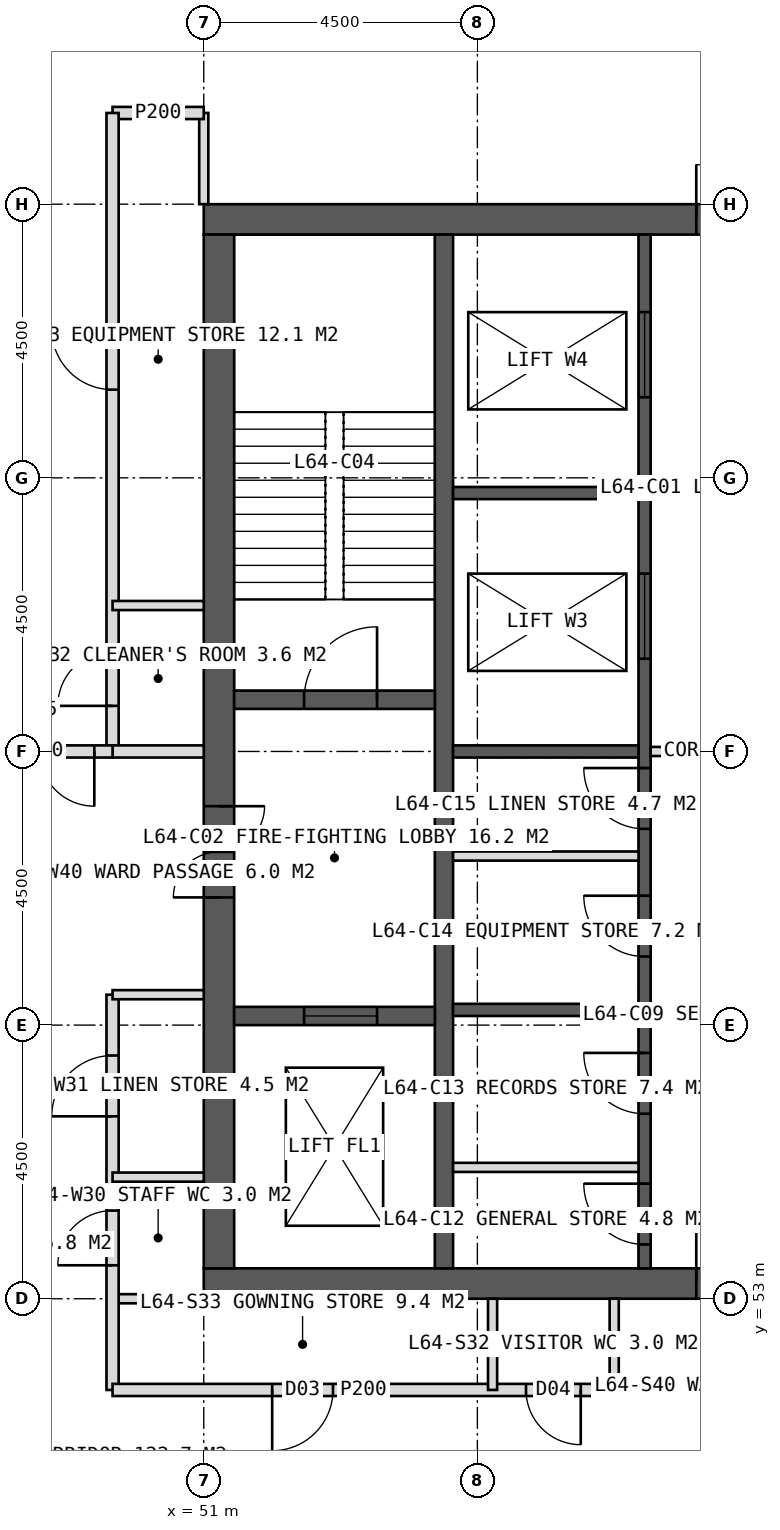
"""IFC4 building model, lengths in metres.
Left out: names, types, materials, properties, quantities, classifications, styles, units other than length and angle.
Written with IfcOpenShell. Run it as: python <this file> out.ifc"""

import sys

from ifc_helpers import new_model, si_unit, direction, frame, frame_2d, origin, place, context, subcontext, project, spatial, rectangle, extrude, element, fill, save


model = new_model("IFC4")
c1 = context("Model", 3, precision=1e-05, world=origin(), true_north=direction((0.0, 1.0)))
c2 = subcontext(c1, "Body", "Model", "MODEL_VIEW")
j1 = project(units=[si_unit("LENGTHUNIT", "METRE"), si_unit("PLANEANGLEUNIT", "RADIAN")], contexts=[c1])
p1 = place(None, origin())
s1 = spatial("IfcSite", under=j1, at=p1, CompositionType="ELEMENT")
p2 = place(p1, origin())
s2 = spatial("IfcBuilding", under=s1, at=p2, CompositionType="ELEMENT")
p3 = place(p2, frame((0.0, 0.0, 266.0)))
s3 = spatial("IfcBuildingStorey", under=s2, at=p3, CompositionType="ELEMENT", Elevation=266.0)
p4 = place(p3, frame((51.0, 70.75, 0.0), z_axis=(0.0, 0.0, 1.0), x_axis=(1.0, 0.0, 0.0)))
e1 = element("IfcWall", 1, at=p4, inside=s3, PredefinedType="SHEAR", context=c2, shape_type="SweptSolid", body=[
    extrude(rectangle(XDim=18.0, YDim=0.5, at=frame_2d((9.0, 0.0))), origin(), (0.0, 0.0, 1.0), 4.0),
])
p5 = place(p4, frame((8.1, 0.0, 0.0)))
e2 = element("IfcOpeningElement", 2, at=p5, cuts=e1, PredefinedType="OPENING", context=c2, shape_type="SweptSolid", body=[
    extrude(rectangle(XDim=1.8, YDim=2.2, at=frame_2d((0.9, 1.1))), frame((0.0, 0.26, 0.0), z_axis=(0.0, -1.0, 0.0), x_axis=(1.0, 0.0, 0.0)), (0.0, 0.0, 1.0), 0.52),
])
p6 = place(p3, frame((51.0, 53.25, 0.0), z_axis=(0.0, 0.0, 1.0), x_axis=(1.0, 0.0, 0.0)))
e3 = element("IfcWall", 3, at=p6, inside=s3, PredefinedType="SHEAR", context=c2, shape_type="SweptSolid", body=[
    extrude(rectangle(XDim=18.0, YDim=0.5, at=frame_2d((9.0, 0.0))), origin(), (0.0, 0.0, 1.0), 4.0),
])
p7 = place(p6, frame((8.1, 0.0, 0.0)))
e4 = element("IfcOpeningElement", 4, at=p7, cuts=e3, PredefinedType="OPENING", context=c2, shape_type="SweptSolid", body=[
    extrude(rectangle(XDim=1.8, YDim=2.2, at=frame_2d((0.9, 1.1))), frame((0.0, 0.26, 0.0), z_axis=(0.0, -1.0, 0.0), x_axis=(1.0, 0.0, 0.0)), (0.0, 0.0, 1.0), 0.52),
])
p8 = place(p3, frame((51.25, 53.5, 0.0), z_axis=(0.0, 0.0, 1.0), x_axis=(0.0, 1.0, 0.0)))
e5 = element("IfcWall", 5, at=p8, inside=s3, PredefinedType="SHEAR", context=c2, shape_type="SweptSolid", body=[
    extrude(rectangle(XDim=17.0, YDim=0.5, at=frame_2d((8.5, 0.0))), origin(), (0.0, 0.0, 1.0), 4.0),
])
p9 = place(p8, frame((6.1, 0.0, 0.0)))
e6 = element("IfcOpeningElement", 6, at=p9, cuts=e5, PredefinedType="OPENING", context=c2, shape_type="SweptSolid", body=[
    extrude(rectangle(XDim=1.5, YDim=2.2, at=frame_2d((0.75, 1.1))), frame((0.0, 0.26, 0.0), z_axis=(0.0, -1.0, 0.0), x_axis=(1.0, 0.0, 0.0)), (0.0, 0.0, 1.0), 0.52),
])
p10 = place(p3, frame((54.95, 53.5, 0.0), z_axis=(0.0, 0.0, 1.0), x_axis=(0.0, 1.0, 0.0)))
e7 = element("IfcWall", 7, at=p10, inside=s3, PredefinedType="SHEAR", context=c2, shape_type="SweptSolid", body=[
    extrude(rectangle(XDim=17.0, YDim=0.3, at=frame_2d((8.5, 0.0))), origin(), (0.0, 0.0, 1.0), 4.0),
])
p11 = place(p3, frame((58.25, 53.5, 0.0), z_axis=(0.0, 0.0, 1.0), x_axis=(0.0, 1.0, 0.0)))
e8 = element("IfcWall", 8, at=p11, inside=s3, PredefinedType="SHEAR", context=c2, shape_type="SweptSolid", body=[
    extrude(rectangle(XDim=17.0, YDim=0.2, at=frame_2d((8.5, 0.0))), origin(), (0.0, 0.0, 1.0), 4.0),
])
p12 = place(p11, frame((0.393, 0.0, 0.0)))
e9 = element("IfcOpeningElement", 9, at=p12, cuts=e8, PredefinedType="OPENING", context=c2, shape_type="SweptSolid", body=[
    extrude(rectangle(XDim=1.0, YDim=2.1, at=frame_2d((0.5, 1.05))), frame((0.0, 0.11, 0.0), z_axis=(0.0, -1.0, 0.0), x_axis=(1.0, 0.0, 0.0)), (0.0, 0.0, 1.0), 0.22),
])
p13 = place(p11, frame((2.542, 0.0, 0.0)))
e10 = element("IfcOpeningElement", 10, at=p13, cuts=e8, PredefinedType="OPENING", context=c2, shape_type="SweptSolid", body=[
    extrude(rectangle(XDim=1.0, YDim=2.1, at=frame_2d((0.5, 1.05))), frame((0.0, 0.11, 0.0), z_axis=(0.0, -1.0, 0.0), x_axis=(1.0, 0.0, 0.0)), (0.0, 0.0, 1.0), 0.22),
])
p14 = place(p11, frame((5.127, 0.0, 0.0)))
e11 = element("IfcOpeningElement", 11, at=p14, cuts=e8, PredefinedType="OPENING", context=c2, shape_type="SweptSolid", body=[
    extrude(rectangle(XDim=1.0, YDim=2.1, at=frame_2d((0.5, 1.05))), frame((0.0, 0.11, 0.0), z_axis=(0.0, -1.0, 0.0), x_axis=(1.0, 0.0, 0.0)), (0.0, 0.0, 1.0), 0.22),
])
p15 = place(p11, frame((7.228, 0.0, 0.0)))
e12 = element("IfcOpeningElement", 12, at=p15, cuts=e8, PredefinedType="OPENING", context=c2, shape_type="SweptSolid", body=[
    extrude(rectangle(XDim=1.0, YDim=2.1, at=frame_2d((0.5, 1.05))), frame((0.0, 0.11, 0.0), z_axis=(0.0, -1.0, 0.0), x_axis=(1.0, 0.0, 0.0)), (0.0, 0.0, 1.0), 0.22),
])
p16 = place(p11, frame((10.025, 0.0, 0.0)))
e13 = element("IfcOpeningElement", 13, at=p16, cuts=e8, PredefinedType="OPENING", context=c2, shape_type="SweptSolid", body=[
    extrude(rectangle(XDim=1.4, YDim=2.2, at=frame_2d((0.7, 1.1))), frame((0.0, 0.11, 0.0), z_axis=(0.0, -1.0, 0.0), x_axis=(1.0, 0.0, 0.0)), (0.0, 0.0, 1.0), 0.22),
])
p17 = place(p11, frame((14.325, 0.0, 0.0)))
e14 = element("IfcOpeningElement", 14, at=p17, cuts=e8, PredefinedType="OPENING", context=c2, shape_type="SweptSolid", body=[
    extrude(rectangle(XDim=1.4, YDim=2.2, at=frame_2d((0.7, 1.1))), frame((0.0, 0.11, 0.0), z_axis=(0.0, -1.0, 0.0), x_axis=(1.0, 0.0, 0.0)), (0.0, 0.0, 1.0), 0.22),
])
for number, where, z_axis, x_axis in (
    (15, (55.1, 57.75, 0.0), (0.0, 0.0, 1.0), (1.0, 0.0, 0.0)),
    (16, (55.1, 62.0, 0.0), (0.0, 0.0, 1.0), (1.0, 0.0, 0.0)),
    (17, (55.1, 66.25, 0.0), (0.0, 0.0, 1.0), (1.0, 0.0, 0.0)),
):
    element("IfcWall", number, at=place(p3, frame(where, z_axis=z_axis, x_axis=x_axis)), inside=s3, PredefinedType="SHEAR", context=c2, shape_type="SweptSolid", body=[
        extrude(rectangle(XDim=3.05, YDim=0.2, at=frame_2d((1.525, 0.0))), origin(), (0.0, 0.0, 1.0), 4.0),
    ])
p18 = place(p3, frame((51.5, 62.85, 0.0), z_axis=(0.0, 0.0, 1.0), x_axis=(1.0, 0.0, 0.0)))
e18 = element("IfcWall", 18, at=p18, inside=s3, PredefinedType="SHEAR", context=c2, shape_type="SweptSolid", body=[
    extrude(rectangle(XDim=3.3, YDim=0.3, at=frame_2d((1.65, 0.0))), origin(), (0.0, 0.0, 1.0), 4.0),
])
p19 = place(p18, frame((1.15, 0.0, 0.0)))
e19 = element("IfcOpeningElement", 19, at=p19, cuts=e18, PredefinedType="OPENING", context=c2, shape_type="SweptSolid", body=[
    extrude(rectangle(XDim=1.2, YDim=2.1, at=frame_2d((0.6, 1.05))), frame((0.0, 0.16, 0.0), z_axis=(0.0, -1.0, 0.0), x_axis=(1.0, 0.0, 0.0)), (0.0, 0.0, 1.0), 0.32),
])
p20 = place(p3, frame((51.5, 57.65, 0.0), z_axis=(0.0, 0.0, 1.0), x_axis=(1.0, 0.0, 0.0)))
e20 = element("IfcWall", 20, at=p20, inside=s3, PredefinedType="SHEAR", context=c2, shape_type="SweptSolid", body=[
    extrude(rectangle(XDim=3.3, YDim=0.3, at=frame_2d((1.65, 0.0))), origin(), (0.0, 0.0, 1.0), 4.0),
])
p21 = place(p20, frame((1.15, 0.0, 0.0)))
e21 = element("IfcOpeningElement", 21, at=p21, cuts=e20, PredefinedType="OPENING", context=c2, shape_type="SweptSolid", body=[
    extrude(rectangle(XDim=1.2, YDim=2.2, at=frame_2d((0.6, 1.1))), frame((0.0, 0.16, 0.0), z_axis=(0.0, -1.0, 0.0), x_axis=(1.0, 0.0, 0.0)), (0.0, 0.0, 1.0), 0.32),
])
p22 = place(p3, frame((51.0, 71.0, 0.0), z_axis=(0.0, 0.0, 1.0), x_axis=(0.0, 1.0, 0.0)))
e22 = element("IfcWall", 22, at=p22, inside=s3, PredefinedType="PARTITIONING", context=c2, shape_type="SweptSolid", body=[
    extrude(rectangle(XDim=1.5, YDim=0.15, at=frame_2d((0.75, 0.0))), origin(), (0.0, 0.0, 1.0), 3.75),
])
p23 = place(p3, frame((49.5, 72.5, 0.0), z_axis=(0.0, 0.0, 1.0), x_axis=(1.0, 0.0, 0.0)))
e23 = element("IfcWall", 23, at=p23, inside=s3, PredefinedType="PARTITIONING", context=c2, shape_type="SweptSolid", body=[
    extrude(rectangle(XDim=1.5, YDim=0.2, at=frame_2d((0.75, 0.0))), origin(), (0.0, 0.0, 1.0), 3.75),
])
p24 = place(p3, frame((51.0, 53.0, 0.0), z_axis=(0.0, 0.0, 1.0), x_axis=(-1.0, 0.0, 0.0)))
e24 = element("IfcWall", 24, at=p24, inside=s3, PredefinedType="PARTITIONING", context=c2, shape_type="SweptSolid", body=[
    extrude(rectangle(XDim=1.5, YDim=0.15, at=frame_2d((0.75, 0.0))), origin(), (0.0, 0.0, 1.0), 3.75),
])
p25 = place(p3, frame((49.5, 51.5, 0.0), z_axis=(0.0, 0.0, 1.0), x_axis=(0.0, 1.0, 0.0)))
e25 = element("IfcWall", 25, at=p25, inside=s3, PredefinedType="PARTITIONING", context=c2, shape_type="SweptSolid", body=[
    extrude(rectangle(XDim=6.5, YDim=0.2, at=frame_2d((3.25, 0.0))), origin(), (0.0, 0.0, 1.0), 3.75),
])
p26 = place(p25, frame((2.05, 0.0, 0.0)))
e26 = element("IfcOpeningElement", 26, at=p26, cuts=e25, PredefinedType="OPENING", context=c2, shape_type="SweptSolid", body=[
    extrude(rectangle(XDim=0.9, YDim=2.1, at=frame_2d((0.45, 1.05))), frame((0.0, 0.11, 0.0), z_axis=(0.0, -1.0, 0.0), x_axis=(1.0, 0.0, 0.0)), (0.0, 0.0, 1.0), 0.22),
])
p27 = place(p25, frame((4.5, 0.0, 0.0)))
e27 = element("IfcOpeningElement", 27, at=p27, cuts=e25, PredefinedType="OPENING", context=c2, shape_type="SweptSolid", body=[
    extrude(rectangle(XDim=1.0, YDim=2.1, at=frame_2d((0.5, 1.05))), frame((0.0, 0.11, 0.0), z_axis=(0.0, -1.0, 0.0), x_axis=(1.0, 0.0, 0.0)), (0.0, 0.0, 1.0), 0.22),
])
p28 = place(p3, frame((49.5, 62.0, 0.0), z_axis=(0.0, 0.0, 1.0), x_axis=(0.0, 1.0, 0.0)))
e28 = element("IfcWall", 28, at=p28, inside=s3, PredefinedType="PARTITIONING", context=c2, shape_type="SweptSolid", body=[
    extrude(rectangle(XDim=10.5, YDim=0.2, at=frame_2d((5.25, 0.0))), origin(), (0.0, 0.0, 1.0), 3.75),
])
p29 = place(p28, frame((0.75, 0.0, 0.0)))
e29 = element("IfcOpeningElement", 29, at=p29, cuts=e28, PredefinedType="OPENING", context=c2, shape_type="SweptSolid", body=[
    extrude(rectangle(XDim=0.9, YDim=2.1, at=frame_2d((0.45, 1.05))), frame((0.0, 0.11, 0.0), z_axis=(0.0, -1.0, 0.0), x_axis=(1.0, 0.0, 0.0)), (0.0, 0.0, 1.0), 0.22),
])
p30 = place(p28, frame((5.95, 0.0, 0.0)))
e30 = element("IfcOpeningElement", 30, at=p30, cuts=e28, PredefinedType="OPENING", context=c2, shape_type="SweptSolid", body=[
    extrude(rectangle(XDim=1.0, YDim=2.1, at=frame_2d((0.5, 1.05))), frame((0.0, 0.11, 0.0), z_axis=(0.0, -1.0, 0.0), x_axis=(1.0, 0.0, 0.0)), (0.0, 0.0, 1.0), 0.22),
])
p31 = place(p3, frame((51.0, 58.0, 0.0), z_axis=(0.0, 0.0, 1.0), x_axis=(-1.0, 0.0, 0.0)))
e31 = element("IfcWall", 31, at=p31, inside=s3, PredefinedType="PARTITIONING", context=c2, shape_type="SweptSolid", body=[
    extrude(rectangle(XDim=1.5, YDim=0.15, at=frame_2d((0.75, 0.0))), origin(), (0.0, 0.0, 1.0), 3.75),
])
p32 = place(p3, frame((51.0, 62.0, 0.0), z_axis=(0.0, 0.0, 1.0), x_axis=(-1.0, 0.0, 0.0)))
e32 = element("IfcWall", 32, at=p32, inside=s3, PredefinedType="SOLIDWALL", context=c2, shape_type="SweptSolid", body=[
    extrude(rectangle(XDim=1.5, YDim=0.2, at=frame_2d((0.75, 0.0))), origin(), (0.0, 0.0, 1.0), 2.75),
])
for number, where, z_axis, x_axis in (
    (33, (51.0, 55.0, 0.0), (0.0, 0.0, 1.0), (-1.0, 0.0, 0.0)),
    (34, (51.0, 64.4, 0.0), (0.0, 0.0, 1.0), (-1.0, 0.0, 0.0)),
):
    element("IfcWall", number, at=place(p3, frame(where, z_axis=z_axis, x_axis=x_axis)), inside=s3, PredefinedType="PARTITIONING", context=c2, shape_type="SweptSolid", body=[
        extrude(rectangle(XDim=1.5, YDim=0.15, at=frame_2d((0.75, 0.0))), origin(), (0.0, 0.0, 1.0), 3.75),
    ])
p33 = place(p3, frame((57.75, 51.5, 0.0), z_axis=(0.0, 0.0, 1.0), x_axis=(-1.0, 0.0, 0.0)))
e35 = element("IfcWall", 35, at=p33, inside=s3, PredefinedType="PARTITIONING", context=c2, shape_type="SweptSolid", body=[
    extrude(rectangle(XDim=8.25, YDim=0.2, at=frame_2d((4.125, 0.0))), origin(), (0.0, 0.0, 1.0), 3.75),
])
p34 = place(p33, frame((0.55, 0.0, 0.0)))
e36 = element("IfcOpeningElement", 36, at=p34, cuts=e35, PredefinedType="OPENING", context=c2, shape_type="SweptSolid", body=[
    extrude(rectangle(XDim=0.9, YDim=2.1, at=frame_2d((0.45, 1.05))), frame((0.0, 0.11, 0.0), z_axis=(0.0, -1.0, 0.0), x_axis=(1.0, 0.0, 0.0)), (0.0, 0.0, 1.0), 0.22),
])
p35 = place(p33, frame((4.625, 0.0, 0.0)))
e37 = element("IfcOpeningElement", 37, at=p35, cuts=e35, PredefinedType="OPENING", context=c2, shape_type="SweptSolid", body=[
    extrude(rectangle(XDim=1.0, YDim=2.1, at=frame_2d((0.5, 1.05))), frame((0.0, 0.11, 0.0), z_axis=(0.0, -1.0, 0.0), x_axis=(1.0, 0.0, 0.0)), (0.0, 0.0, 1.0), 0.22),
])
p36 = place(p3, frame((57.75, 53.0, 0.0), z_axis=(0.0, 0.0, 1.0), x_axis=(0.0, -1.0, 0.0)))
e38 = element("IfcWall", 38, at=p36, inside=s3, PredefinedType="PARTITIONING", context=c2, shape_type="SweptSolid", body=[
    extrude(rectangle(XDim=1.5, YDim=0.15, at=frame_2d((0.75, 0.0))), origin(), (0.0, 0.0, 1.0), 3.75),
])
p37 = place(p3, frame((55.75, 53.0, 0.0), z_axis=(0.0, 0.0, 1.0), x_axis=(0.0, -1.0, 0.0)))
e39 = element("IfcWall", 39, at=p37, inside=s3, PredefinedType="PARTITIONING", context=c2, shape_type="SweptSolid", body=[
    extrude(rectangle(XDim=1.5, YDim=0.15, at=frame_2d((0.75, 0.0))), origin(), (0.0, 0.0, 1.0), 2.95),
])
p38 = place(p3, frame((49.5, 62.0, 0.0), z_axis=(0.0, 0.0, 1.0), x_axis=(-1.0, 0.0, 0.0)))
e40 = element("IfcWall", 40, at=p38, inside=s3, PredefinedType="SOLIDWALL", context=c2, shape_type="SweptSolid", body=[
    extrude(rectangle(XDim=2.6, YDim=0.2, at=frame_2d((1.3, 0.0))), origin(), (0.0, 0.0, 1.0), 2.75),
])
p39 = place(p38, frame((0.3, 0.0, 0.0)))
e41 = element("IfcOpeningElement", 41, at=p39, cuts=e40, PredefinedType="OPENING", context=c2, shape_type="SweptSolid", body=[
    extrude(rectangle(XDim=1.8, YDim=2.2, at=frame_2d((0.9, 1.1))), frame((0.0, 0.11, 0.0), z_axis=(0.0, -1.0, 0.0), x_axis=(1.0, 0.0, 0.0)), (0.0, 0.0, 1.0), 0.22),
])
for number, where, z_axis, x_axis in (
    (42, (55.1, 55.16, 0.0), (0.0, 0.0, 1.0), (1.0, 0.0, 0.0)),
    (43, (55.1, 60.28, 0.0), (0.0, 0.0, 1.0), (1.0, 0.0, 0.0)),
):
    element("IfcWall", number, at=place(p3, frame(where, z_axis=z_axis, x_axis=x_axis)), inside=s3, PredefinedType="PARTITIONING", context=c2, shape_type="SweptSolid", body=[
        extrude(rectangle(XDim=3.05, YDim=0.15, at=frame_2d((1.525, 0.0))), origin(), (0.0, 0.0, 1.0), 3.75),
    ])
p40 = place(p3, frame((58.35, 62.0, 0.0), z_axis=(0.0, 0.0, 1.0), x_axis=(1.0, 0.0, 0.0)))
e44 = element("IfcWall", 44, at=p40, inside=s3, PredefinedType="PARTITIONING", context=c2, shape_type="SweptSolid", body=[
    extrude(rectangle(XDim=3.3, YDim=0.15, at=frame_2d((1.65, 0.0))), origin(), (0.0, 0.0, 1.0), 3.75),
])
p41 = place(p26, origin())
e45 = element("IfcDoor", 45, at=p41, inside=s3, OperationType="SINGLE_SWING_LEFT", PredefinedType="DOOR", context=c2, shape_type="SweptSolid", body=[
    extrude(rectangle(XDim=0.9, YDim=2.1, at=frame_2d((0.45, 1.05))), frame((0.0, 0.025, 0.0), z_axis=(0.0, -1.0, 0.0), x_axis=(1.0, 0.0, 0.0)), (0.0, 0.0, 1.0), 0.05),
])
fill(e26, e45)
p42 = place(p27, origin())
e46 = element("IfcDoor", 46, at=p42, inside=s3, OperationType="SINGLE_SWING_LEFT", PredefinedType="DOOR", context=c2, shape_type="SweptSolid", body=[
    extrude(rectangle(XDim=1.0, YDim=2.1, at=frame_2d((0.5, 1.05))), frame((0.0, 0.025, 0.0), z_axis=(0.0, -1.0, 0.0), x_axis=(1.0, 0.0, 0.0)), (0.0, 0.0, 1.0), 0.05),
])
fill(e27, e46)
p43 = place(p29, origin())
e47 = element("IfcDoor", 47, at=p43, inside=s3, OperationType="SINGLE_SWING_LEFT", PredefinedType="DOOR", context=c2, shape_type="SweptSolid", body=[
    extrude(rectangle(XDim=0.9, YDim=2.1, at=frame_2d((0.45, 1.05))), frame((0.0, 0.025, 0.0), z_axis=(0.0, -1.0, 0.0), x_axis=(1.0, 0.0, 0.0)), (0.0, 0.0, 1.0), 0.05),
])
fill(e29, e47)
p44 = place(p30, origin())
e48 = element("IfcDoor", 48, at=p44, inside=s3, OperationType="SINGLE_SWING_RIGHT", PredefinedType="DOOR", context=c2, shape_type="SweptSolid", body=[
    extrude(rectangle(XDim=1.0, YDim=2.1, at=frame_2d((0.5, 1.05))), frame((0.0, 0.025, 0.0), z_axis=(0.0, -1.0, 0.0), x_axis=(1.0, 0.0, 0.0)), (0.0, 0.0, 1.0), 0.05),
])
fill(e30, e48)
p45 = place(p34, origin())
e49 = element("IfcDoor", 49, at=p45, inside=s3, OperationType="SINGLE_SWING_LEFT", PredefinedType="DOOR", context=c2, shape_type="SweptSolid", body=[
    extrude(rectangle(XDim=0.9, YDim=2.1, at=frame_2d((0.45, 1.05))), frame((0.0, 0.025, 0.0), z_axis=(0.0, -1.0, 0.0), x_axis=(1.0, 0.0, 0.0)), (0.0, 0.0, 1.0), 0.05),
])
fill(e36, e49)
p46 = place(p35, origin())
e50 = element("IfcDoor", 50, at=p46, inside=s3, OperationType="SINGLE_SWING_RIGHT", PredefinedType="DOOR", context=c2, shape_type="SweptSolid", body=[
    extrude(rectangle(XDim=1.0, YDim=2.1, at=frame_2d((0.5, 1.05))), frame((0.0, 0.025, 0.0), z_axis=(0.0, -1.0, 0.0), x_axis=(1.0, 0.0, 0.0)), (0.0, 0.0, 1.0), 0.05),
])
fill(e37, e50)
p47 = place(p39, origin())
e51 = element("IfcDoor", 51, at=p47, inside=s3, OperationType="DOUBLE_DOOR_DOUBLE_SWING", PredefinedType="DOOR", context=c2, shape_type="SweptSolid", body=[
    extrude(rectangle(XDim=1.8, YDim=2.2, at=frame_2d((0.9, 1.1))), frame((0.0, 0.025, 0.0), z_axis=(0.0, -1.0, 0.0), x_axis=(1.0, 0.0, 0.0)), (0.0, 0.0, 1.0), 0.05),
])
fill(e41, e51)
p48 = place(p5, origin())
e52 = element("IfcDoor", 52, at=p48, inside=s3, OperationType="DOUBLE_DOOR_SINGLE_SWING", PredefinedType="DOOR", context=c2, shape_type="SweptSolid", body=[
    extrude(rectangle(XDim=1.8, YDim=2.2, at=frame_2d((0.9, 1.1))), frame((0.0, 0.025, 0.0), z_axis=(0.0, -1.0, 0.0), x_axis=(1.0, 0.0, 0.0)), (0.0, 0.0, 1.0), 0.05),
])
fill(e2, e52)
p49 = place(p9, origin())
e53 = element("IfcDoor", 53, at=p49, inside=s3, OperationType="DOUBLE_DOOR_SINGLE_SWING", PredefinedType="DOOR", context=c2, shape_type="SweptSolid", body=[
    extrude(rectangle(XDim=1.5, YDim=2.2, at=frame_2d((0.75, 1.1))), frame((0.0, 0.025, 0.0), z_axis=(0.0, -1.0, 0.0), x_axis=(1.0, 0.0, 0.0)), (0.0, 0.0, 1.0), 0.05),
])
fill(e6, e53)
p50 = place(p19, origin())
e54 = element("IfcDoor", 54, at=p50, inside=s3, OperationType="SINGLE_SWING_RIGHT", PredefinedType="DOOR", context=c2, shape_type="SweptSolid", body=[
    extrude(rectangle(XDim=1.2, YDim=2.1, at=frame_2d((0.6, 1.05))), frame((0.0, 0.025, 0.0), z_axis=(0.0, -1.0, 0.0), x_axis=(1.0, 0.0, 0.0)), (0.0, 0.0, 1.0), 0.05),
])
fill(e19, e54)
p51 = place(p21, origin())
e55 = element("IfcDoor", 55, at=p51, inside=s3, OperationType="SLIDING_TO_LEFT", PredefinedType="DOOR", context=c2, shape_type="SweptSolid", body=[
    extrude(rectangle(XDim=1.2, YDim=2.2, at=frame_2d((0.6, 1.1))), frame((0.0, 0.025, 0.0), z_axis=(0.0, -1.0, 0.0), x_axis=(1.0, 0.0, 0.0)), (0.0, 0.0, 1.0), 0.05),
])
fill(e21, e55)
p52 = place(p12, origin())
e56 = element("IfcDoor", 56, at=p52, inside=s3, OperationType="SINGLE_SWING_RIGHT", PredefinedType="DOOR", context=c2, shape_type="SweptSolid", body=[
    extrude(rectangle(XDim=1.0, YDim=2.1, at=frame_2d((0.5, 1.05))), frame((0.0, 0.025, 0.0), z_axis=(0.0, -1.0, 0.0), x_axis=(1.0, 0.0, 0.0)), (0.0, 0.0, 1.0), 0.05),
])
fill(e9, e56)
p53 = place(p13, origin())
e57 = element("IfcDoor", 57, at=p53, inside=s3, OperationType="SINGLE_SWING_RIGHT", PredefinedType="DOOR", context=c2, shape_type="SweptSolid", body=[
    extrude(rectangle(XDim=1.0, YDim=2.1, at=frame_2d((0.5, 1.05))), frame((0.0, 0.025, 0.0), z_axis=(0.0, -1.0, 0.0), x_axis=(1.0, 0.0, 0.0)), (0.0, 0.0, 1.0), 0.05),
])
fill(e10, e57)
p54 = place(p14, origin())
e58 = element("IfcDoor", 58, at=p54, inside=s3, OperationType="SINGLE_SWING_RIGHT", PredefinedType="DOOR", context=c2, shape_type="SweptSolid", body=[
    extrude(rectangle(XDim=1.0, YDim=2.1, at=frame_2d((0.5, 1.05))), frame((0.0, 0.025, 0.0), z_axis=(0.0, -1.0, 0.0), x_axis=(1.0, 0.0, 0.0)), (0.0, 0.0, 1.0), 0.05),
])
fill(e11, e58)
p55 = place(p15, origin())
e59 = element("IfcDoor", 59, at=p55, inside=s3, OperationType="SINGLE_SWING_RIGHT", PredefinedType="DOOR", context=c2, shape_type="SweptSolid", body=[
    extrude(rectangle(XDim=1.0, YDim=2.1, at=frame_2d((0.5, 1.05))), frame((0.0, 0.025, 0.0), z_axis=(0.0, -1.0, 0.0), x_axis=(1.0, 0.0, 0.0)), (0.0, 0.0, 1.0), 0.05),
])
fill(e12, e59)
p56 = place(p16, origin())
e60 = element("IfcDoor", 60, at=p56, inside=s3, OperationType="SLIDING_TO_LEFT", PredefinedType="DOOR", context=c2, shape_type="SweptSolid", body=[
    extrude(rectangle(XDim=1.4, YDim=2.2, at=frame_2d((0.7, 1.1))), frame((0.0, 0.025, 0.0), z_axis=(0.0, -1.0, 0.0), x_axis=(1.0, 0.0, 0.0)), (0.0, 0.0, 1.0), 0.05),
])
fill(e13, e60)
p57 = place(p17, origin())
e61 = element("IfcDoor", 61, at=p57, inside=s3, OperationType="SLIDING_TO_LEFT", PredefinedType="DOOR", context=c2, shape_type="SweptSolid", body=[
    extrude(rectangle(XDim=1.4, YDim=2.2, at=frame_2d((0.7, 1.1))), frame((0.0, 0.025, 0.0), z_axis=(0.0, -1.0, 0.0), x_axis=(1.0, 0.0, 0.0)), (0.0, 0.0, 1.0), 0.05),
])
fill(e14, e61)
p58 = place(p7, origin())
e62 = element("IfcDoor", 62, at=p58, inside=s3, OperationType="DOUBLE_DOOR_SINGLE_SWING", PredefinedType="DOOR", context=c2, shape_type="SweptSolid", body=[
    extrude(rectangle(XDim=1.8, YDim=2.2, at=frame_2d((0.9, 1.1))), frame((0.0, 0.025, 0.0), z_axis=(0.0, -1.0, 0.0), x_axis=(1.0, 0.0, 0.0)), (0.0, 0.0, 1.0), 0.05),
])
fill(e4, e62)
save(model, sys.argv[1])
